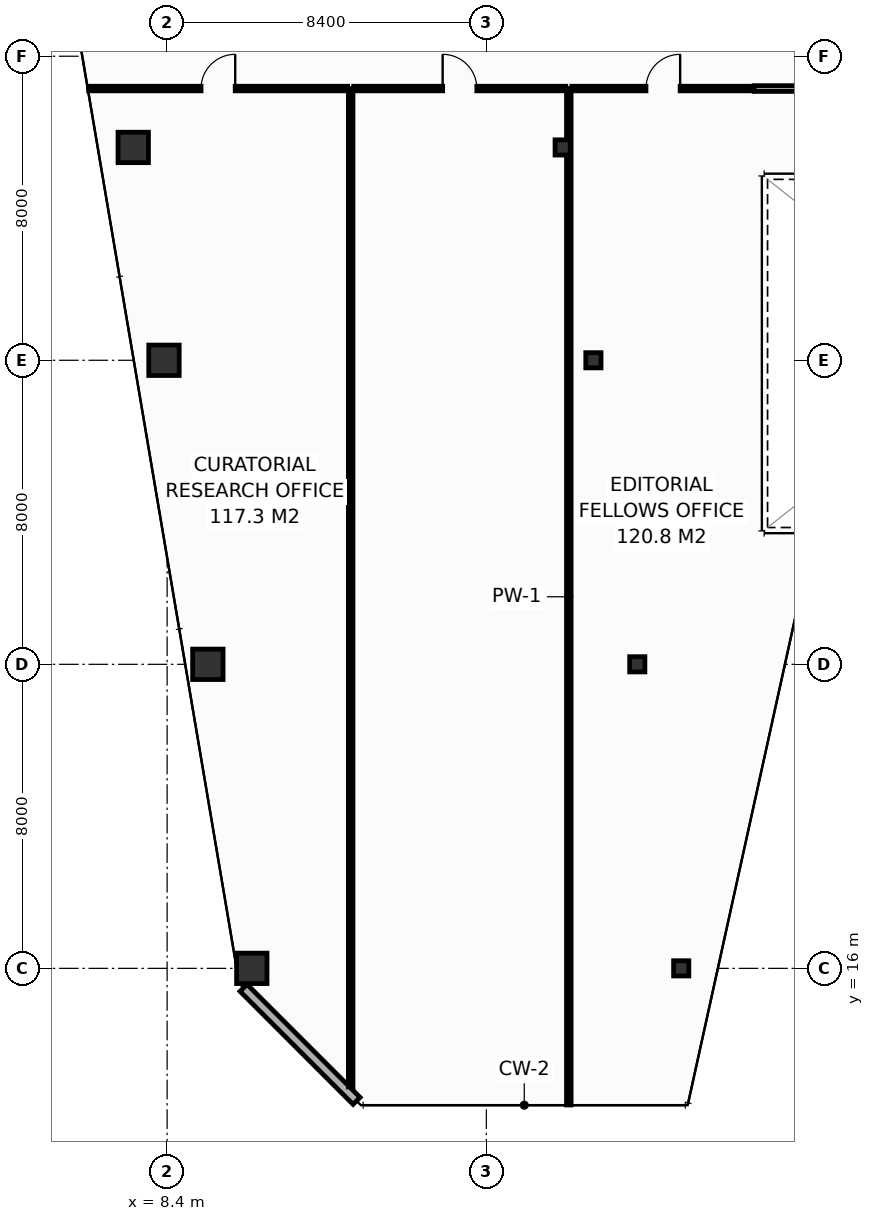
"""IFC4 building model, lengths in metres.
Left out: names, types, materials, properties, quantities, classifications, styles, units other than length and angle.
Written with IfcOpenShell. Run it as: python <this file> out.ifc"""

import sys

from ifc_helpers import new_model, si_unit, direction, frame, frame_2d, origin, origin_2d, place, context, subcontext, project, spatial, rectangle, hollow_rectangle, extrude, element, fill, save


model = new_model("IFC4")
c1 = context("Model", 3, precision=1e-05, world=origin(), true_north=direction((0.0, 1.0)))
c2 = subcontext(c1, "Body", "Model", "MODEL_VIEW")
j1 = project(units=[si_unit("LENGTHUNIT", "METRE"), si_unit("PLANEANGLEUNIT", "RADIAN")], contexts=[c1])
p1 = place(None, origin())
s1 = spatial("IfcSite", under=j1, at=p1, CompositionType="ELEMENT")
p2 = place(p1, origin())
s2 = spatial("IfcBuilding", under=s1, at=p2, CompositionType="ELEMENT")
p3 = place(p2, frame((0.0, 0.0, 182.8)))
s3 = spatial("IfcBuildingStorey", under=s2, at=p3, CompositionType="ELEMENT", Elevation=182.8)
p4 = place(p3, frame((10.628, 16.0, 0.0), z_axis=(0.0, 0.0, 1.0), x_axis=(1.0, 0.0, 0.0)))
e1 = element("IfcColumn", 1, at=p4, inside=s3, PredefinedType="COLUMN", context=c2, shape_type="SweptSolid", body=[
    extrude(hollow_rectangle(XDim=0.8, YDim=0.8, WallThickness=0.036, at=origin_2d()), origin(), (0.0, 0.0, 1.0), 3.8),
])
p5 = place(p3, frame((21.928, 16.0, 0.0), z_axis=(0.0, 0.0, 1.0), x_axis=(1.0, 0.0, 0.0)))
e2 = element("IfcColumn", 2, at=p5, inside=s3, PredefinedType="COLUMN", context=c2, shape_type="SweptSolid", body=[
    extrude(hollow_rectangle(XDim=0.4, YDim=0.4, WallThickness=0.016, at=origin_2d()), origin(), (0.0, 0.0, 1.0), 3.8),
])
p6 = place(p3, frame((9.472, 24.0, 0.0), z_axis=(0.0, 0.0, 1.0), x_axis=(1.0, 0.0, 0.0)))
e3 = element("IfcColumn", 3, at=p6, inside=s3, PredefinedType="COLUMN", context=c2, shape_type="SweptSolid", body=[
    extrude(hollow_rectangle(XDim=0.8, YDim=0.8, WallThickness=0.036, at=origin_2d()), origin(), (0.0, 0.0, 1.0), 3.8),
])
p7 = place(p3, frame((20.772, 24.0, 0.0), z_axis=(0.0, 0.0, 1.0), x_axis=(1.0, 0.0, 0.0)))
e4 = element("IfcColumn", 4, at=p7, inside=s3, PredefinedType="COLUMN", context=c2, shape_type="SweptSolid", body=[
    extrude(hollow_rectangle(XDim=0.4, YDim=0.4, WallThickness=0.016, at=origin_2d()), origin(), (0.0, 0.0, 1.0), 3.8),
])
p8 = place(p3, frame((8.317, 32.0, 0.0), z_axis=(0.0, 0.0, 1.0), x_axis=(1.0, 0.0, 0.0)))
e5 = element("IfcColumn", 5, at=p8, inside=s3, PredefinedType="COLUMN", context=c2, shape_type="SweptSolid", body=[
    extrude(hollow_rectangle(XDim=0.8, YDim=0.8, WallThickness=0.036, at=origin_2d()), origin(), (0.0, 0.0, 1.0), 3.8),
])
p9 = place(p3, frame((19.617, 32.0, 0.0), z_axis=(0.0, 0.0, 1.0), x_axis=(1.0, 0.0, 0.0)))
e6 = element("IfcColumn", 6, at=p9, inside=s3, PredefinedType="COLUMN", context=c2, shape_type="SweptSolid", body=[
    extrude(hollow_rectangle(XDim=0.4, YDim=0.4, WallThickness=0.016, at=origin_2d()), origin(), (0.0, 0.0, 1.0), 3.8),
])
p10 = place(p3, frame((7.508, 37.6, 0.0), z_axis=(0.0, 0.0, 1.0), x_axis=(1.0, 0.0, 0.0)))
e7 = element("IfcColumn", 7, at=p10, inside=s3, PredefinedType="COLUMN", context=c2, shape_type="SweptSolid", body=[
    extrude(hollow_rectangle(XDim=0.8, YDim=0.8, WallThickness=0.036, at=origin_2d()), origin(), (0.0, 0.0, 1.0), 3.8),
])
p11 = place(p3, frame((18.808, 37.6, 0.0), z_axis=(0.0, 0.0, 1.0), x_axis=(1.0, 0.0, 0.0)))
e8 = element("IfcColumn", 8, at=p11, inside=s3, PredefinedType="COLUMN", context=c2, shape_type="SweptSolid", body=[
    extrude(hollow_rectangle(XDim=0.4, YDim=0.4, WallThickness=0.016, at=origin_2d()), origin(), (0.0, 0.0, 1.0), 3.8),
])
p12 = place(p3, frame((10.411, 15.487, 0.0), z_axis=(0.0, 0.0, 1.0), x_axis=(0.707135806771, -0.70707775441, 0.0)))
e9 = element("IfcWall", 9, at=p12, inside=s3, PredefinedType="STANDARD", context=c2, shape_type="SweptSolid", body=[
    extrude(rectangle(XDim=4.206, YDim=0.26, at=frame_2d((2.103, 0.0))), origin(), (0.0, 0.0, 1.0), 3.55),
])
p13 = place(p3, frame((13.23, 12.88, 0.0), z_axis=(0.0, 0.0, 1.0), x_axis=(0.0, 1.0, 0.0)))
e10 = element("IfcWall", 10, at=p13, inside=s3, PredefinedType="PARTITIONING", context=c2, shape_type="SweptSolid", body=[
    extrude(rectangle(XDim=26.27, YDim=0.12, at=frame_2d((13.135, 0.0))), origin(), (0.0, 0.0, 1.0), 2.835),
])
p14 = place(p3, frame((18.97, 12.405, 0.0), z_axis=(0.0, 0.0, 1.0), x_axis=(0.0, 1.0, 0.0)))
e11 = element("IfcWall", 11, at=p14, inside=s3, PredefinedType="PARTITIONING", context=c2, shape_type="SweptSolid", body=[
    extrude(rectangle(XDim=26.745, YDim=0.12, at=frame_2d((13.373, 0.0))), origin(), (0.0, 0.0, 1.0), 2.835),
])
p15 = place(p3, frame((6.334, 39.15, 0.0), z_axis=(0.0, 0.0, 1.0), x_axis=(1.0, 0.0, 0.0)))
e12 = element("IfcWall", 12, at=p15, inside=s3, PredefinedType="PARTITIONING", context=c2, shape_type="SweptSolid", body=[
    extrude(rectangle(XDim=6.816, YDim=0.12, at=frame_2d((3.408, 0.0))), origin(), (0.0, 0.0, 1.0), 3.035),
])
p16 = place(p15, frame((2.958, 0.0, 0.0)))
e13 = element("IfcOpeningElement", 13, at=p16, cuts=e12, PredefinedType="OPENING", context=c2, shape_type="SweptSolid", body=[
    extrude(rectangle(XDim=0.9, YDim=2.1, at=frame_2d((0.45, 1.05))), frame((0.0, 0.07, 0.0), z_axis=(0.0, -1.0, 0.0), x_axis=(1.0, 0.0, 0.0)), (0.0, 0.0, 1.0), 0.14),
])
p17 = place(p3, frame((13.31, 39.15, 0.0), z_axis=(0.0, 0.0, 1.0), x_axis=(1.0, 0.0, 0.0)))
e14 = element("IfcWall", 14, at=p17, inside=s3, PredefinedType="PARTITIONING", context=c2, shape_type="SweptSolid", body=[
    extrude(rectangle(XDim=5.58, YDim=0.12, at=frame_2d((2.79, 0.0))), origin(), (0.0, 0.0, 1.0), 3.55),
])
p18 = place(p17, frame((2.34, 0.0, 0.0)))
e15 = element("IfcOpeningElement", 15, at=p18, cuts=e14, PredefinedType="OPENING", context=c2, shape_type="SweptSolid", body=[
    extrude(rectangle(XDim=0.9, YDim=2.1, at=frame_2d((0.45, 1.05))), frame((0.0, 0.07, 0.0), z_axis=(0.0, -1.0, 0.0), x_axis=(1.0, 0.0, 0.0)), (0.0, 0.0, 1.0), 0.14),
])
p19 = place(p3, frame((19.05, 39.15, 0.0), z_axis=(0.0, 0.0, 1.0), x_axis=(1.0, 0.0, 0.0)))
e16 = element("IfcWall", 16, at=p19, inside=s3, PredefinedType="PARTITIONING", context=c2, shape_type="SweptSolid", body=[
    extrude(rectangle(XDim=4.8, YDim=0.12, at=frame_2d((2.4, 0.0))), origin(), (0.0, 0.0, 1.0), 2.835),
])
p20 = place(p19, frame((1.95, 0.0, 0.0)))
e17 = element("IfcOpeningElement", 17, at=p20, cuts=e16, PredefinedType="OPENING", context=c2, shape_type="SweptSolid", body=[
    extrude(rectangle(XDim=0.9, YDim=2.1, at=frame_2d((0.45, 1.05))), frame((0.0, 0.07, 0.0), z_axis=(0.0, -1.0, 0.0), x_axis=(1.0, 0.0, 0.0)), (0.0, 0.0, 1.0), 0.14),
])
p21 = place(p3, frame((23.85, 39.15, 0.0), z_axis=(0.0, 0.0, 1.0), x_axis=(1.0, 0.0, 0.0)))
e18 = element("IfcWall", 18, at=p21, inside=s3, PredefinedType="PARTITIONING", context=c2, shape_type="SweptSolid", body=[
    extrude(rectangle(XDim=12.3, YDim=0.15, at=frame_2d((6.15, 0.0))), origin(), (0.0, 0.0, 1.0), 3.55),
])
p22 = place(p16, origin())
e19 = element("IfcDoor", 19, at=p22, inside=s3, OperationType="SINGLE_SWING_RIGHT", PredefinedType="DOOR", context=c2, shape_type="SweptSolid", body=[
    extrude(rectangle(XDim=0.9, YDim=2.1, at=frame_2d((0.45, 1.05))), frame((0.0, 0.025, 0.0), z_axis=(0.0, -1.0, 0.0), x_axis=(1.0, 0.0, 0.0)), (0.0, 0.0, 1.0), 0.05),
])
fill(e13, e19)
p23 = place(p18, origin())
e20 = element("IfcDoor", 20, at=p23, inside=s3, OperationType="SINGLE_SWING_LEFT", PredefinedType="DOOR", context=c2, shape_type="SweptSolid", body=[
    extrude(rectangle(XDim=0.9, YDim=2.1, at=frame_2d((0.45, 1.05))), frame((0.0, 0.025, 0.0), z_axis=(0.0, -1.0, 0.0), x_axis=(1.0, 0.0, 0.0)), (0.0, 0.0, 1.0), 0.05),
])
fill(e15, e20)
p24 = place(p20, origin())
e21 = element("IfcDoor", 21, at=p24, inside=s3, OperationType="SINGLE_SWING_RIGHT", PredefinedType="DOOR", context=c2, shape_type="SweptSolid", body=[
    extrude(rectangle(XDim=0.9, YDim=2.1, at=frame_2d((0.45, 1.05))), frame((0.0, 0.025, 0.0), z_axis=(0.0, -1.0, 0.0), x_axis=(1.0, 0.0, 0.0)), (0.0, 0.0, 1.0), 0.05),
])
fill(e17, e21)
save(model, sys.argv[1])
